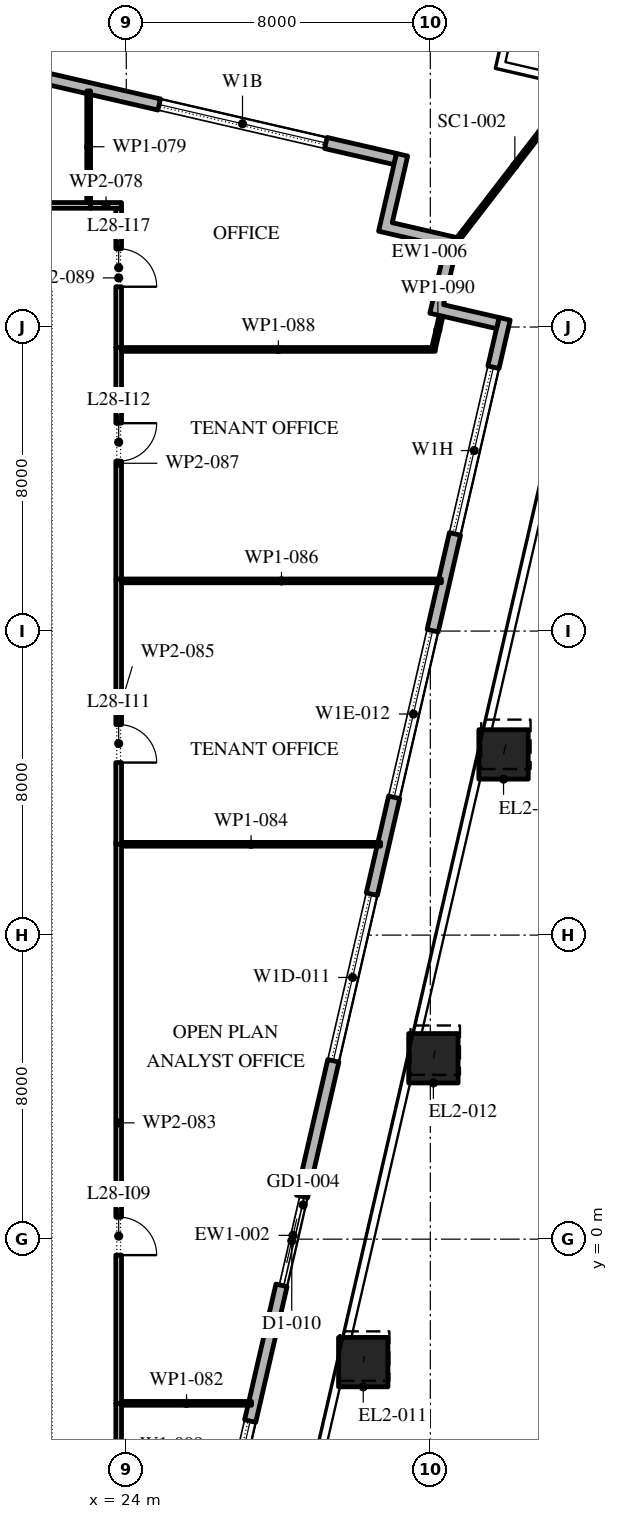
"""IFC4 building model, lengths in metres.
Left out: names, types, materials, properties, quantities, classifications, styles, units other than length and angle.
Written with IfcOpenShell. Run it as: python <this file> out.ifc"""

import sys

from ifc_helpers import new_model, si_unit, direction, frame, frame_2d, origin, origin_2d, place, context, subcontext, project, spatial, polyline, rectangle, outline, extrude, element, fill, save


model = new_model("IFC4")
c1 = context("Model", 3, precision=1e-05, world=origin(), true_north=direction((0.0, 1.0)))
c2 = subcontext(c1, "Body", "Model", "MODEL_VIEW")
j1 = project(units=[si_unit("LENGTHUNIT", "METRE"), si_unit("PLANEANGLEUNIT", "RADIAN")], contexts=[c1])
p1 = place(None, origin())
s1 = spatial("IfcSite", under=j1, at=p1, CompositionType="ELEMENT")
p2 = place(p1, origin())
s2 = spatial("IfcBuilding", under=s1, at=p2, CompositionType="ELEMENT")
p3 = place(p2, frame((0.0, 0.0, 130.8)))
s3 = spatial("IfcBuildingStorey", under=s2, at=p3, CompositionType="ELEMENT", Elevation=130.8)
p4 = place(p3, frame((30.235, -3.235, 0.0), z_axis=(0.00871280379, 0.037929739166, 0.999242424008), x_axis=(-0.974617095667, 0.223878352757, 0.0)))
e1 = element("IfcColumn", 1, at=p4, inside=s3, PredefinedType="COLUMN", context=c2, shape_type="SweptSolid", body=[
    extrude(rectangle(XDim=1.3, YDim=1.3, at=origin_2d()), origin(), (0.0, 0.0, 1.0), 4.203),
])
p5 = place(p3, frame((32.081, 4.76, 0.0), z_axis=(0.011668267153, 0.050562490995, 0.998652735462), x_axis=(-0.974391195695, 0.224859506699, 0.0)))
e2 = element("IfcColumn", 2, at=p5, inside=s3, PredefinedType="COLUMN", context=c2, shape_type="SweptSolid", body=[
    extrude(rectangle(XDim=1.3, YDim=1.3, at=origin_2d()), origin(), (0.0, 0.0, 1.0), 4.206),
])
p6 = place(p3, frame((33.927, 12.754, 0.0), z_axis=(0.014559788571, 0.063169759976, 0.997896584813), x_axis=(-0.97445148511, 0.224598092528, 0.0)))
e3 = element("IfcColumn", 3, at=p6, inside=s3, PredefinedType="COLUMN", context=c2, shape_type="SweptSolid", body=[
    extrude(rectangle(XDim=1.3, YDim=1.3, at=origin_2d()), origin(), (0.0, 0.0, 1.0), 4.209),
])
p7 = place(p3, frame((22.82, -24.016, 0.0), z_axis=(0.0, 0.0, 1.0), x_axis=(0.224953880882, 0.974369412223, 0.0)))
e4 = element("IfcWall", 4, at=p7, inside=s3, PredefinedType="STANDARD", context=c2, shape_type="SweptSolid", body=[
    extrude(rectangle(XDim=49.5, YDim=0.3, at=frame_2d((24.75, 0.0))), origin(), (0.0, 0.0, 1.0), 4.0),
])
p8 = place(p7, frame((1.157, 0.0, 0.45)))
e5 = element("IfcOpeningElement", 5, at=p8, cuts=e4, PredefinedType="OPENING", context=c2, shape_type="SweptSolid", body=[
    extrude(rectangle(XDim=4.5, YDim=3.05, at=frame_2d((2.25, 1.525))), frame((0.0, 0.16, 0.0), z_axis=(0.0, -1.0, 0.0), x_axis=(1.0, 0.0, 0.0)), (0.0, 0.0, 1.0), 0.32),
])
p9 = place(p7, frame((8.121, 0.0, 0.45)))
e6 = element("IfcOpeningElement", 6, at=p9, cuts=e4, PredefinedType="OPENING", context=c2, shape_type="SweptSolid", body=[
    extrude(rectangle(XDim=4.5, YDim=3.05, at=frame_2d((2.25, 1.525))), frame((0.0, 0.16, 0.0), z_axis=(0.0, -1.0, 0.0), x_axis=(1.0, 0.0, 0.0)), (0.0, 0.0, 1.0), 0.32),
])
p10 = place(p7, frame((15.236, 0.0, 0.45)))
e7 = element("IfcOpeningElement", 7, at=p10, cuts=e4, PredefinedType="OPENING", context=c2, shape_type="SweptSolid", body=[
    extrude(rectangle(XDim=4.5, YDim=3.05, at=frame_2d((2.25, 1.525))), frame((0.0, 0.16, 0.0), z_axis=(0.0, -1.0, 0.0), x_axis=(1.0, 0.0, 0.0)), (0.0, 0.0, 1.0), 0.32),
])
p11 = place(p7, frame((23.4, 0.0, 0.0)))
e8 = element("IfcOpeningElement", 8, at=p11, cuts=e4, PredefinedType="OPENING", context=c2, shape_type="SweptSolid", body=[
    extrude(rectangle(XDim=2.4, YDim=3.5, at=frame_2d((1.2, 1.75))), frame((0.0, 0.16, 0.0), z_axis=(0.0, -1.0, 0.0), x_axis=(1.0, 0.0, 0.0)), (0.0, 0.0, 1.0), 0.32),
])
p12 = place(p7, frame((29.464, 0.0, 0.45)))
e9 = element("IfcOpeningElement", 9, at=p12, cuts=e4, PredefinedType="OPENING", context=c2, shape_type="SweptSolid", body=[
    extrude(rectangle(XDim=4.5, YDim=2.875, at=frame_2d((2.25, 1.438))), frame((0.0, 0.16, 0.0), z_axis=(0.0, -1.0, 0.0), x_axis=(1.0, 0.0, 0.0)), (0.0, 0.0, 1.0), 0.32),
])
p13 = place(p7, frame((36.579, 0.0, 0.45)))
e10 = element("IfcOpeningElement", 10, at=p13, cuts=e4, PredefinedType="OPENING", context=c2, shape_type="SweptSolid", body=[
    extrude(rectangle(XDim=4.5, YDim=2.825, at=frame_2d((2.25, 1.413))), frame((0.0, 0.16, 0.0), z_axis=(0.0, -1.0, 0.0), x_axis=(1.0, 0.0, 0.0)), (0.0, 0.0, 1.0), 0.32),
])
p14 = place(p7, frame((43.693, 0.0, 0.45)))
e11 = element("IfcOpeningElement", 11, at=p14, cuts=e4, PredefinedType="OPENING", context=c2, shape_type="SweptSolid", body=[
    extrude(rectangle(XDim=4.5, YDim=2.75, at=frame_2d((2.25, 1.375))), frame((0.0, 0.16, 0.0), z_axis=(0.0, -1.0, 0.0), x_axis=(1.0, 0.0, 0.0)), (0.0, 0.0, 1.0), 0.32),
])
p15 = place(p3, frame((31.078, 28.421, 0.0), z_axis=(0.0, 0.0, 1.0), x_axis=(-0.974370456532, 0.224949357493, 0.0)))
e12 = element("IfcWall", 12, at=p15, inside=s3, PredefinedType="STANDARD", context=c2, shape_type="SweptSolid", body=[
    extrude(rectangle(XDim=51.0, YDim=0.3, at=frame_2d((25.5, 0.0))), origin(), (0.0, 0.0, 1.0), 4.0),
])
p16 = place(p15, frame((1.875, 0.0, 0.45)))
e13 = element("IfcOpeningElement", 13, at=p16, cuts=e12, PredefinedType="OPENING", context=c2, shape_type="SweptSolid", body=[
    extrude(rectangle(XDim=4.5, YDim=2.95, at=frame_2d((2.25, 1.475))), frame((0.0, 0.16, 0.0), z_axis=(0.0, -1.0, 0.0), x_axis=(1.0, 0.0, 0.0)), (0.0, 0.0, 1.0), 0.32),
])
p17 = place(p15, frame((10.275, 0.0, 0.45)))
e14 = element("IfcOpeningElement", 14, at=p17, cuts=e12, PredefinedType="OPENING", context=c2, shape_type="SweptSolid", body=[
    extrude(rectangle(XDim=4.5, YDim=2.825, at=frame_2d((2.25, 1.413))), frame((0.0, 0.16, 0.0), z_axis=(0.0, -1.0, 0.0), x_axis=(1.0, 0.0, 0.0)), (0.0, 0.0, 1.0), 0.32),
])
p18 = place(p15, frame((18.825, 0.0, 0.45)))
e15 = element("IfcOpeningElement", 15, at=p18, cuts=e12, PredefinedType="OPENING", context=c2, shape_type="SweptSolid", body=[
    extrude(rectangle(XDim=4.5, YDim=2.8, at=frame_2d((2.25, 1.4))), frame((0.0, 0.16, 0.0), z_axis=(0.0, -1.0, 0.0), x_axis=(1.0, 0.0, 0.0)), (0.0, 0.0, 1.0), 0.32),
])
p19 = place(p15, frame((27.075, 0.0, 0.0)))
e16 = element("IfcOpeningElement", 16, at=p19, cuts=e12, PredefinedType="OPENING", context=c2, shape_type="SweptSolid", body=[
    extrude(rectangle(XDim=2.4, YDim=3.125, at=frame_2d((1.2, 1.562))), frame((0.0, 0.16, 0.0), z_axis=(0.0, -1.0, 0.0), x_axis=(1.0, 0.0, 0.0)), (0.0, 0.0, 1.0), 0.32),
])
p20 = place(p15, frame((35.925, 0.0, 0.45)))
e17 = element("IfcOpeningElement", 17, at=p20, cuts=e12, PredefinedType="OPENING", context=c2, shape_type="SweptSolid", body=[
    extrude(rectangle(XDim=4.5, YDim=2.575, at=frame_2d((2.25, 1.288))), frame((0.0, 0.16, 0.0), z_axis=(0.0, -1.0, 0.0), x_axis=(1.0, 0.0, 0.0)), (0.0, 0.0, 1.0), 0.32),
])
p21 = place(p15, frame((44.475, 0.0, 0.45)))
e18 = element("IfcOpeningElement", 18, at=p21, cuts=e12, PredefinedType="OPENING", context=c2, shape_type="SweptSolid", body=[
    extrude(rectangle(XDim=4.5, YDim=2.45, at=frame_2d((2.25, 1.225))), frame((0.0, 0.16, 0.0), z_axis=(0.0, -1.0, 0.0), x_axis=(1.0, 0.0, 0.0)), (0.0, 0.0, 1.0), 0.32),
])
p22 = place(p3, origin())
e19 = element("IfcWall", 19, at=p22, inside=s3, PredefinedType="STANDARD", context=c2, shape_type="SweptSolid", body=[
    extrude(outline(polyline([(32.393, 26.116), (30.639, 26.521), (31.111, 28.567), (31.404, 28.5), (30.999, 26.746), (32.753, 26.341), (32.348, 24.587), (33.809, 24.25), (33.742, 23.957), (31.988, 24.362), (32.393, 26.116)])), origin(), (0.0, 0.0, 1.0), 4.0),
])
p23 = place(p3, frame((32.753, 26.341, -0.05), z_axis=(0.0, 0.0, 1.0), x_axis=(0.610481388074, 0.792030602196, 0.0)))
e20 = element("IfcWall", 20, at=p23, inside=s3, PredefinedType="STANDARD", context=c2, shape_type="SweptSolid", body=[
    extrude(rectangle(XDim=4.821, YDim=0.1, at=frame_2d((2.411, 0.0))), origin(), (0.0, 0.0, 1.0), 4.05),
])
p24 = place(p3, frame((10.27, 27.2, 0.0), z_axis=(0.0, 0.0, 1.0), x_axis=(1.0, 0.0, 0.0)))
e21 = element("IfcWall", 21, at=p24, inside=s3, PredefinedType="PARTITIONING", context=c2, shape_type="SweptSolid", body=[
    extrude(rectangle(XDim=12.79, YDim=0.15, at=frame_2d((6.395, 0.0))), origin(), (0.0, 0.0, 1.0), 4.0),
])
p25 = place(p24, frame((7.09, 0.0, 0.0)))
e22 = element("IfcOpeningElement", 22, at=p25, cuts=e21, PredefinedType="OPENING", context=c2, shape_type="SweptSolid", body=[
    extrude(rectangle(XDim=1.0, YDim=2.1, at=frame_2d((0.5, 1.05))), frame((0.0, 0.085, 0.0), z_axis=(0.0, -1.0, 0.0), x_axis=(1.0, 0.0, 0.0)), (0.0, 0.0, 1.0), 0.17),
])
p26 = place(p3, frame((23.06, 27.2, 0.0), z_axis=(0.0, 0.0, 1.0), x_axis=(1.0, 0.0, 0.0)))
e23 = element("IfcWall", 23, at=p26, inside=s3, PredefinedType="PARTITIONING", context=c2, shape_type="SweptSolid", body=[
    extrude(rectangle(XDim=0.815, YDim=0.15, at=frame_2d((0.407, 0.0))), origin(), (0.0, 0.0, 1.0), 4.0),
])
p27 = place(p3, frame((23.01, 30.212, 0.0), z_axis=(0.0, 0.0, 1.0), x_axis=(0.0, -1.0, 0.0)))
e24 = element("IfcWall", 24, at=p27, inside=s3, PredefinedType="PARTITIONING", context=c2, shape_type="SweptSolid", body=[
    extrude(rectangle(XDim=2.937, YDim=0.1, at=frame_2d((1.469, 0.0))), origin(), (0.0, 0.0, 1.0), 4.0),
])
p28 = place(p3, frame((23.8, -4.32, 0.0), z_axis=(0.0, 0.0, 1.0), x_axis=(0.0, -1.0, 0.0)))
e25 = element("IfcWall", 25, at=p28, inside=s3, PredefinedType="PARTITIONING", context=c2, shape_type="SweptSolid", body=[
    extrude(rectangle(XDim=3.105, YDim=0.15, at=frame_2d((1.552, 0.0))), origin(), (0.0, 0.0, 1.0), 4.0),
])
p29 = place(p28, frame((1.53, 0.0, 0.0)))
e26 = element("IfcOpeningElement", 26, at=p29, cuts=e25, PredefinedType="OPENING", context=c2, shape_type="SweptSolid", body=[
    extrude(rectangle(XDim=1.0, YDim=2.1, at=frame_2d((0.5, 1.05))), frame((0.0, 0.085, 0.0), z_axis=(0.0, -1.0, 0.0), x_axis=(1.0, 0.0, 0.0)), (0.0, 0.0, 1.0), 0.17),
])
p30 = place(p3, frame((23.875, -4.32, 0.0), z_axis=(0.0, 0.0, 1.0), x_axis=(1.0, 0.0, 0.0)))
e27 = element("IfcWall", 27, at=p30, inside=s3, PredefinedType="PARTITIONING", context=c2, shape_type="SweptSolid", body=[
    extrude(rectangle(XDim=3.421, YDim=0.1, at=frame_2d((1.71, 0.0))), origin(), (0.0, 0.0, 1.0), 4.0),
])
p31 = place(p3, frame((23.8, 10.44, 0.0), z_axis=(0.0, 0.0, 1.0), x_axis=(0.0, -1.0, 0.0)))
e28 = element("IfcWall", 28, at=p31, inside=s3, PredefinedType="PARTITIONING", context=c2, shape_type="SweptSolid", body=[
    extrude(rectangle(XDim=14.76, YDim=0.15, at=frame_2d((7.38, 0.0))), origin(), (0.0, 0.0, 1.0), 4.0),
])
p32 = place(p31, frame((9.86, 0.0, 0.0)))
e29 = element("IfcOpeningElement", 29, at=p32, cuts=e28, PredefinedType="OPENING", context=c2, shape_type="SweptSolid", body=[
    extrude(rectangle(XDim=1.0, YDim=2.1, at=frame_2d((0.5, 1.05))), frame((0.0, 0.085, 0.0), z_axis=(0.0, -1.0, 0.0), x_axis=(1.0, 0.0, 0.0)), (0.0, 0.0, 1.0), 0.17),
])
p33 = place(p3, frame((23.875, 10.39, 0.0), z_axis=(0.0, 0.0, 1.0), x_axis=(1.0, 0.0, 0.0)))
e30 = element("IfcWall", 30, at=p33, inside=s3, PredefinedType="PARTITIONING", context=c2, shape_type="SweptSolid", body=[
    extrude(rectangle(XDim=6.817, YDim=0.1, at=frame_2d((3.408, 0.0))), origin(), (0.0, 0.0, 1.0), 4.0),
])
p34 = place(p3, frame((23.8, 17.37, 0.0), z_axis=(0.0, 0.0, 1.0), x_axis=(0.0, -1.0, 0.0)))
e31 = element("IfcWall", 31, at=p34, inside=s3, PredefinedType="PARTITIONING", context=c2, shape_type="SweptSolid", body=[
    extrude(rectangle(XDim=6.98, YDim=0.15, at=frame_2d((3.49, 0.0))), origin(), (0.0, 0.0, 1.0), 4.0),
])
p35 = place(p34, frame((3.83, 0.0, 0.0)))
e32 = element("IfcOpeningElement", 32, at=p35, cuts=e31, PredefinedType="OPENING", context=c2, shape_type="SweptSolid", body=[
    extrude(rectangle(XDim=1.0, YDim=2.1, at=frame_2d((0.5, 1.05))), frame((0.0, 0.085, 0.0), z_axis=(0.0, -1.0, 0.0), x_axis=(1.0, 0.0, 0.0)), (0.0, 0.0, 1.0), 0.17),
])
p36 = place(p3, frame((23.875, 17.32, 0.0), z_axis=(0.0, 0.0, 1.0), x_axis=(1.0, 0.0, 0.0)))
e33 = element("IfcWall", 33, at=p36, inside=s3, PredefinedType="PARTITIONING", context=c2, shape_type="SweptSolid", body=[
    extrude(rectangle(XDim=8.417, YDim=0.1, at=frame_2d((4.208, 0.0))), origin(), (0.0, 0.0, 1.0), 4.0),
])
p37 = place(p3, frame((23.8, 23.46, 0.0), z_axis=(0.0, 0.0, 1.0), x_axis=(0.0, -1.0, 0.0)))
e34 = element("IfcWall", 34, at=p37, inside=s3, PredefinedType="PARTITIONING", context=c2, shape_type="SweptSolid", body=[
    extrude(rectangle(XDim=6.09, YDim=0.15, at=frame_2d((3.045, 0.0))), origin(), (0.0, 0.0, 1.0), 4.0),
])
p38 = place(p37, frame((1.99, 0.0, 0.0)))
e35 = element("IfcOpeningElement", 35, at=p38, cuts=e34, PredefinedType="OPENING", context=c2, shape_type="SweptSolid", body=[
    extrude(rectangle(XDim=1.0, YDim=2.1, at=frame_2d((0.5, 1.05))), frame((0.0, 0.085, 0.0), z_axis=(0.0, -1.0, 0.0), x_axis=(1.0, 0.0, 0.0)), (0.0, 0.0, 1.0), 0.17),
])
p39 = place(p3, frame((23.875, 23.41, 0.0), z_axis=(0.0, 0.0, 1.0), x_axis=(1.0, 0.0, 0.0)))
e36 = element("IfcWall", 36, at=p39, inside=s3, PredefinedType="PARTITIONING", context=c2, shape_type="SweptSolid", body=[
    extrude(rectangle(XDim=8.255, YDim=0.1, at=frame_2d((4.127, 0.0))), origin(), (0.0, 0.0, 1.0), 4.0),
])
p40 = place(p3, frame((23.8, 27.125, 0.0), z_axis=(0.0, 0.0, 1.0), x_axis=(0.0, -1.0, 0.0)))
e37 = element("IfcWall", 37, at=p40, inside=s3, PredefinedType="PARTITIONING", context=c2, shape_type="SweptSolid", body=[
    extrude(rectangle(XDim=3.665, YDim=0.15, at=frame_2d((1.833, 0.0))), origin(), (0.0, 0.0, 1.0), 4.0),
])
p41 = place(p40, frame((1.065, 0.0, 0.0)))
e38 = element("IfcOpeningElement", 38, at=p41, cuts=e37, PredefinedType="OPENING", context=c2, shape_type="SweptSolid", body=[
    extrude(rectangle(XDim=1.0, YDim=2.1, at=frame_2d((0.5, 1.05))), frame((0.0, 0.085, 0.0), z_axis=(0.0, -1.0, 0.0), x_axis=(1.0, 0.0, 0.0)), (0.0, 0.0, 1.0), 0.17),
])
p42 = place(p3, frame((32.091, 23.459, 0.0), z_axis=(0.0, 0.0, 1.0), x_axis=(0.223406444343, 0.97472537703, 0.0)))
e39 = element("IfcWall", 39, at=p42, inside=s3, PredefinedType="PARTITIONING", context=c2, shape_type="SweptSolid", body=[
    extrude(rectangle(XDim=0.957, YDim=0.1, at=frame_2d((0.479, 0.0))), origin(), (0.0, 0.0, 1.0), 4.0),
])
p43 = place(p10, origin())
e40 = element("IfcWindow", 40, at=p43, inside=s3, PartitioningType="DOUBLE_PANEL_VERTICAL", PredefinedType="WINDOW", context=c2, shape_type="SweptSolid", body=[
    extrude(rectangle(XDim=4.5, YDim=3.05, at=frame_2d((2.25, 1.525))), frame((0.0, 0.03, 0.0), z_axis=(0.0, -1.0, 0.0), x_axis=(1.0, 0.0, 0.0)), (0.0, 0.0, 1.0), 0.06),
])
fill(e7, e40)
p44 = place(p11, origin())
e41 = element("IfcDoor", 41, at=p44, inside=s3, OperationType="DOUBLE_DOOR_SLIDING", PredefinedType="DOOR", context=c2, shape_type="SweptSolid", body=[
    extrude(rectangle(XDim=2.4, YDim=3.5, at=frame_2d((1.2, 1.75))), frame((0.0, 0.025, 0.0), z_axis=(0.0, -1.0, 0.0), x_axis=(1.0, 0.0, 0.0)), (0.0, 0.0, 1.0), 0.05),
])
fill(e8, e41)
p45 = place(p12, origin())
e42 = element("IfcWindow", 42, at=p45, inside=s3, PartitioningType="DOUBLE_PANEL_VERTICAL", PredefinedType="WINDOW", context=c2, shape_type="SweptSolid", body=[
    extrude(rectangle(XDim=4.5, YDim=2.875, at=frame_2d((2.25, 1.438))), frame((0.0, 0.03, 0.0), z_axis=(0.0, -1.0, 0.0), x_axis=(1.0, 0.0, 0.0)), (0.0, 0.0, 1.0), 0.06),
])
fill(e9, e42)
p46 = place(p13, origin())
e43 = element("IfcWindow", 43, at=p46, inside=s3, PartitioningType="DOUBLE_PANEL_VERTICAL", PredefinedType="WINDOW", context=c2, shape_type="SweptSolid", body=[
    extrude(rectangle(XDim=4.5, YDim=2.825, at=frame_2d((2.25, 1.413))), frame((0.0, 0.03, 0.0), z_axis=(0.0, -1.0, 0.0), x_axis=(1.0, 0.0, 0.0)), (0.0, 0.0, 1.0), 0.06),
])
fill(e10, e43)
p47 = place(p14, origin())
e44 = element("IfcWindow", 44, at=p47, inside=s3, PartitioningType="DOUBLE_PANEL_VERTICAL", PredefinedType="WINDOW", context=c2, shape_type="SweptSolid", body=[
    extrude(rectangle(XDim=4.5, YDim=2.75, at=frame_2d((2.25, 1.375))), frame((0.0, 0.03, 0.0), z_axis=(0.0, -1.0, 0.0), x_axis=(1.0, 0.0, 0.0)), (0.0, 0.0, 1.0), 0.06),
])
fill(e11, e44)
p48 = place(p16, origin())
e45 = element("IfcWindow", 45, at=p48, inside=s3, PartitioningType="DOUBLE_PANEL_VERTICAL", PredefinedType="WINDOW", context=c2, shape_type="SweptSolid", body=[
    extrude(rectangle(XDim=4.5, YDim=2.95, at=frame_2d((2.25, 1.475))), frame((0.0, 0.03, 0.0), z_axis=(0.0, -1.0, 0.0), x_axis=(1.0, 0.0, 0.0)), (0.0, 0.0, 1.0), 0.06),
])
fill(e13, e45)
p49 = place(p32, origin())
e46 = element("IfcDoor", 46, at=p49, inside=s3, OperationType="SINGLE_SWING_LEFT", PredefinedType="DOOR", context=c2, shape_type="SweptSolid", body=[
    extrude(rectangle(XDim=1.0, YDim=2.1, at=frame_2d((0.5, 1.05))), frame((0.0, 0.025, 0.0), z_axis=(0.0, -1.0, 0.0), x_axis=(1.0, 0.0, 0.0)), (0.0, 0.0, 1.0), 0.05),
])
fill(e29, e46)
p50 = place(p35, origin())
e47 = element("IfcDoor", 47, at=p50, inside=s3, OperationType="SINGLE_SWING_LEFT", PredefinedType="DOOR", context=c2, shape_type="SweptSolid", body=[
    extrude(rectangle(XDim=1.0, YDim=2.1, at=frame_2d((0.5, 1.05))), frame((0.0, 0.025, 0.0), z_axis=(0.0, -1.0, 0.0), x_axis=(1.0, 0.0, 0.0)), (0.0, 0.0, 1.0), 0.05),
])
fill(e32, e47)
p51 = place(p38, origin())
e48 = element("IfcDoor", 48, at=p51, inside=s3, OperationType="SINGLE_SWING_RIGHT", PredefinedType="DOOR", context=c2, shape_type="SweptSolid", body=[
    extrude(rectangle(XDim=1.0, YDim=2.1, at=frame_2d((0.5, 1.05))), frame((0.0, 0.025, 0.0), z_axis=(0.0, -1.0, 0.0), x_axis=(1.0, 0.0, 0.0)), (0.0, 0.0, 1.0), 0.05),
])
fill(e35, e48)
p52 = place(p41, origin())
e49 = element("IfcDoor", 49, at=p52, inside=s3, OperationType="SINGLE_SWING_LEFT", PredefinedType="DOOR", context=c2, shape_type="SweptSolid", body=[
    extrude(rectangle(XDim=1.0, YDim=2.1, at=frame_2d((0.5, 1.05))), frame((0.0, 0.025, 0.0), z_axis=(0.0, -1.0, 0.0), x_axis=(1.0, 0.0, 0.0)), (0.0, 0.0, 1.0), 0.05),
])
fill(e38, e49)
save(model, sys.argv[1])
